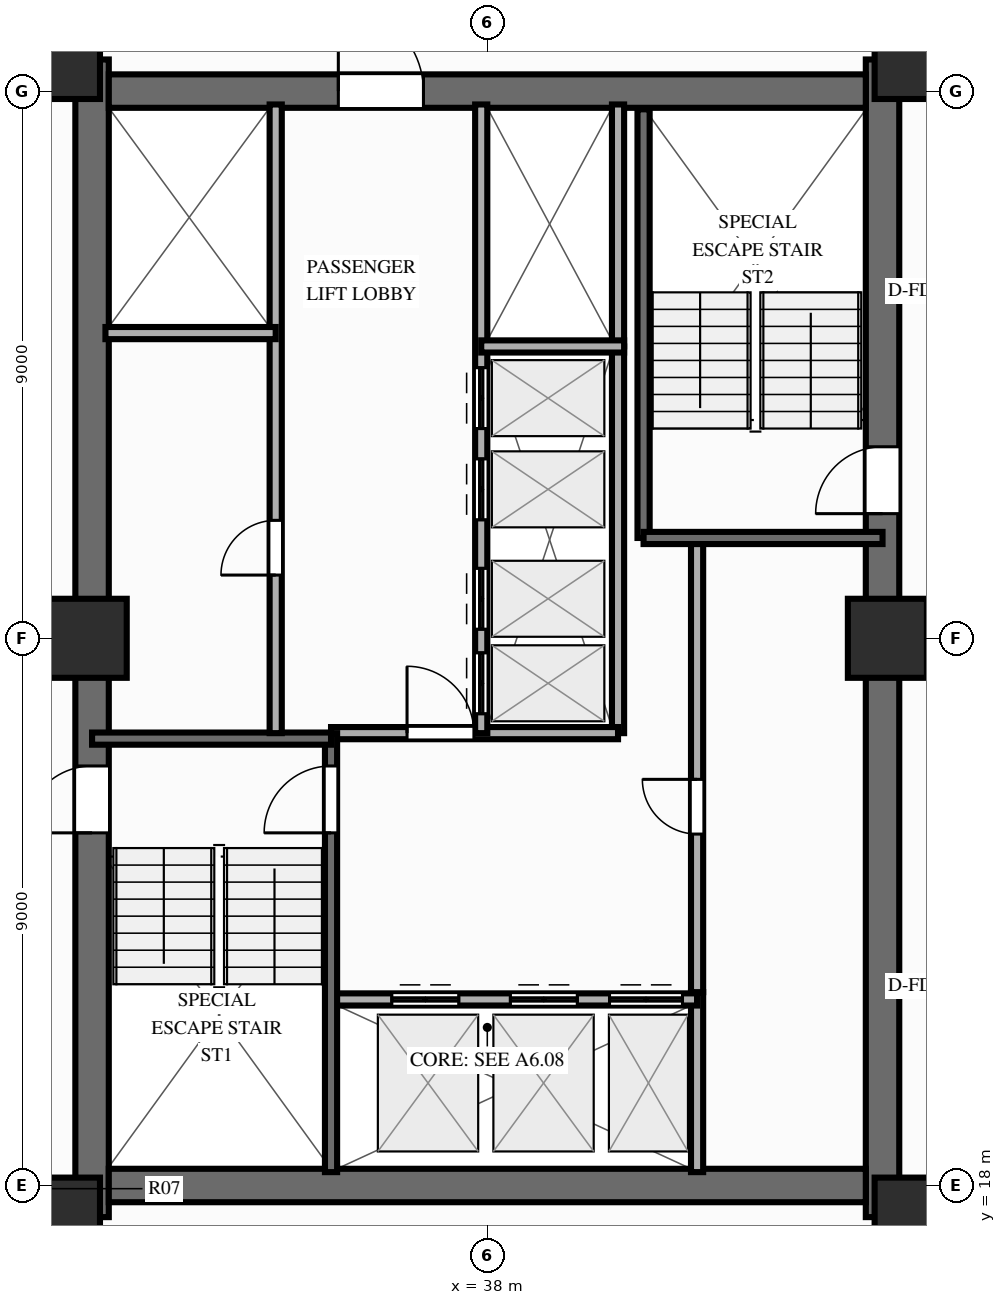
"""IFC4 building model, lengths in metres.
Left out: names, types, materials, properties, quantities, classifications, styles, units other than length and angle.
Written with IfcOpenShell. Run it as: python <this file> out.ifc"""

import sys

from ifc_helpers import new_model, si_unit, direction, frame, frame_2d, origin, origin_2d, place, context, subcontext, project, spatial, rectangle, extrude, source, transform, mapped, element, fill, save


model = new_model("IFC4")
c1 = context("Model", 3, precision=1e-05, world=origin(), true_north=direction((0.0, 1.0)))
c2 = subcontext(c1, "Body", "Model", "MODEL_VIEW")
j1 = project(units=[si_unit("LENGTHUNIT", "METRE"), si_unit("PLANEANGLEUNIT", "RADIAN")], contexts=[c1])
p1 = place(None, origin())
s1 = spatial("IfcSite", under=j1, at=p1, CompositionType="ELEMENT")
p2 = place(p1, origin())
s2 = spatial("IfcBuilding", under=s1, at=p2, CompositionType="ELEMENT")
p3 = place(p2, frame((0.0, 0.0, 138.75)))
s3 = spatial("IfcBuildingStorey", under=s2, at=p3, CompositionType="ELEMENT", Elevation=138.75)
p4 = place(p3, frame((31.5, 17.48, 0.0), z_axis=(0.0, 0.0, 1.0), x_axis=(0.0, 1.0, 0.0)))
e1 = element("IfcWall", 1, at=p4, inside=s3, PredefinedType="SHEAR", context=c2, shape_type="SweptSolid", body=[
    extrude(rectangle(XDim=19.04, YDim=0.55, at=frame_2d((9.52, 0.0))), origin(), (0.0, 0.0, 1.0), 3.0),
])
p5 = place(p4, frame((6.32, 0.0, 0.0)))
e2 = element("IfcOpeningElement", 2, at=p5, cuts=e1, PredefinedType="OPENING", context=c2, shape_type="SweptSolid", body=[
    extrude(rectangle(XDim=1.1, YDim=2.15, at=frame_2d((0.55, 1.075))), frame((0.0, 0.287, 0.0), z_axis=(0.0, -1.0, 0.0), x_axis=(1.0, 0.0, 0.0)), (0.0, 0.0, 1.0), 0.574),
])
p6 = place(p3, frame((44.5, 17.48, 0.0), z_axis=(0.0, 0.0, 1.0), x_axis=(0.0, 1.0, 0.0)))
e3 = element("IfcWall", 3, at=p6, inside=s3, PredefinedType="SHEAR", context=c2, shape_type="SweptSolid", body=[
    extrude(rectangle(XDim=19.04, YDim=0.55, at=frame_2d((9.52, 0.0))), origin(), (0.0, 0.0, 1.0), 3.0),
])
p7 = place(p6, frame((12.67, 0.0, 0.0), z_axis=(0.0, 0.0, 1.0), x_axis=(-1.0, 0.0, 0.0)))
e4 = element("IfcOpeningElement", 4, at=p7, cuts=e3, PredefinedType="OPENING", context=c2, shape_type="SweptSolid", body=[
    extrude(rectangle(XDim=1.1, YDim=2.15, at=frame_2d((0.55, 1.075))), frame((0.0, 0.287, 0.0), z_axis=(0.0, -1.0, 0.0), x_axis=(1.0, 0.0, 0.0)), (0.0, 0.0, 1.0), 0.574),
])
p8 = place(p3, frame((31.775, 18.0, 0.0), z_axis=(0.0, 0.0, 1.0), x_axis=(1.0, 0.0, 0.0)))
e5 = element("IfcWall", 5, at=p8, inside=s3, PredefinedType="SHEAR", context=c2, shape_type="SweptSolid", body=[
    extrude(rectangle(XDim=12.45, YDim=0.55, at=frame_2d((6.225, 0.0))), origin(), (0.0, 0.0, 1.0), 3.0),
])
p9 = place(p3, frame((31.775, 36.0, 0.0), z_axis=(0.0, 0.0, 1.0), x_axis=(1.0, 0.0, 0.0)))
e6 = element("IfcWall", 6, at=p9, inside=s3, PredefinedType="SHEAR", context=c2, shape_type="SweptSolid", body=[
    extrude(rectangle(XDim=12.45, YDim=0.55, at=frame_2d((6.225, 0.0))), origin(), (0.0, 0.0, 1.0), 3.0),
])
p10 = place(p9, frame((5.175, 0.0, 0.0), z_axis=(0.0, 0.0, 1.0), x_axis=(-1.0, 0.0, 0.0)))
e7 = element("IfcOpeningElement", 7, at=p10, cuts=e6, PredefinedType="OPENING", context=c2, shape_type="SweptSolid", body=[
    extrude(rectangle(XDim=1.4, YDim=2.15, at=frame_2d((0.7, 1.075))), frame((0.0, 0.287, 0.0), z_axis=(0.0, -1.0, 0.0), x_axis=(1.0, 0.0, 0.0)), (0.0, 0.0, 1.0), 0.574),
])
m1 = source(origin(), c2, "Body", "SweptSolid", [
    extrude(rectangle(XDim=1.3, YDim=1.3, at=origin_2d()), origin(), (0.0, 0.0, 1.0), 3.0),
])
for number, where, z_axis, x_axis in (
    (8, (30.98, 17.48, 0.0), (0.0, 0.0, 1.0), (1.0, 0.0, 0.0)),
    (9, (45.02, 17.48, 0.0), (0.0, 0.0, 1.0), (1.0, 0.0, 0.0)),
    (10, (30.98, 36.52, 0.0), (0.0, 0.0, 1.0), (1.0, 0.0, 0.0)),
    (11, (45.02, 36.52, 0.0), (0.0, 0.0, 1.0), (1.0, 0.0, 0.0)),
    (12, (31.42, 27.0, 0.0), (0.0, 0.0, 1.0), (1.0, 0.0, 0.0)),
    (13, (44.58, 27.0, 0.0), (0.0, 0.0, 1.0), (1.0, 0.0, 0.0)),
):
    element("IfcColumn", number, at=place(p3, frame(where, z_axis=z_axis, x_axis=x_axis)), inside=s3, PredefinedType="COLUMN", context=c2, shape_type="MappedRepresentation", body=[
        mapped(m1, transform((0.0, 0.0, 0.0), scale=1.0)),
    ])
p11 = place(p3, frame((41.45, 18.22, 0.0), z_axis=(0.0, 0.0, 1.0), x_axis=(0.0, 1.0, 0.0)))
e14 = element("IfcWall", 14, at=p11, inside=s3, PredefinedType="PARTITIONING", context=c2, shape_type="SweptSolid", body=[
    extrude(rectangle(XDim=2.96, YDim=0.2, at=frame_2d((1.48, 0.0))), origin(), (0.0, 0.0, 1.0), 2.79),
])
p12 = place(p3, frame((41.45, 21.18, 0.0), z_axis=(0.0, 0.0, 1.0), x_axis=(0.0, 1.0, 0.0)))
e15 = element("IfcWall", 15, at=p12, inside=s3, PredefinedType="PARTITIONING", context=c2, shape_type="SweptSolid", body=[
    extrude(rectangle(XDim=7.42, YDim=0.2, at=frame_2d((3.71, 0.0))), origin(), (0.0, 0.0, 1.0), 2.79),
])
p13 = place(p12, frame((2.6, 0.0, 0.0)))
e16 = element("IfcOpeningElement", 16, at=p13, cuts=e15, PredefinedType="OPENING", context=c2, shape_type="SweptSolid", body=[
    extrude(rectangle(XDim=0.9, YDim=2.1, at=frame_2d((0.45, 1.05))), frame((0.0, 0.112, 0.0), z_axis=(0.0, -1.0, 0.0), x_axis=(1.0, 0.0, 0.0)), (0.0, 0.0, 1.0), 0.224),
])
p14 = place(p3, frame((40.15, 25.44, 0.0), z_axis=(0.0, 0.0, 1.0), x_axis=(0.0, 1.0, 0.0)))
e17 = element("IfcWall", 17, at=p14, inside=s3, PredefinedType="PARTITIONING", context=c2, shape_type="SweptSolid", body=[
    extrude(rectangle(XDim=6.36, YDim=0.2, at=frame_2d((3.18, 0.0))), origin(), (0.0, 0.0, 1.0), 2.79),
])
p15 = place(p3, frame((40.15, 31.8, 0.0), z_axis=(0.0, 0.0, 1.0), x_axis=(0.0, 1.0, 0.0)))
e18 = element("IfcWall", 18, at=p15, inside=s3, PredefinedType="PARTITIONING", context=c2, shape_type="SweptSolid", body=[
    extrude(rectangle(XDim=3.98, YDim=0.2, at=frame_2d((1.99, 0.0))), origin(), (0.0, 0.0, 1.0), 2.79),
])
p16 = place(p3, frame((35.43, 21.06, 0.0), z_axis=(0.0, 0.0, 1.0), x_axis=(1.0, 0.0, 0.0)))
e19 = element("IfcWall", 19, at=p16, inside=s3, PredefinedType="PARTITIONING", context=c2, shape_type="SweptSolid", body=[
    extrude(rectangle(XDim=6.02, YDim=0.2, at=frame_2d((3.01, 0.0))), origin(), (0.0, 0.0, 1.0), 2.79),
])
p17 = place(p16, frame((1.0, 0.0, 0.0)))
e20 = element("IfcOpeningElement", 20, at=p17, cuts=e19, PredefinedType="OPENING", context=c2, shape_type="SweptSolid", body=[
    extrude(rectangle(XDim=1.1, YDim=2.15, at=frame_2d((0.55, 1.075))), frame((0.0, 0.112, 0.0), z_axis=(0.0, -1.0, 0.0), x_axis=(1.0, 0.0, 0.0)), (0.0, 0.0, 1.0), 0.224),
])
p18 = place(p16, frame((2.95, 0.0, 0.0)))
e21 = element("IfcOpeningElement", 21, at=p18, cuts=e19, PredefinedType="OPENING", context=c2, shape_type="SweptSolid", body=[
    extrude(rectangle(XDim=1.1, YDim=2.15, at=frame_2d((0.55, 1.075))), frame((0.0, 0.112, 0.0), z_axis=(0.0, -1.0, 0.0), x_axis=(1.0, 0.0, 0.0)), (0.0, 0.0, 1.0), 0.224),
])
p19 = place(p16, frame((4.58, 0.0, 0.0)))
e22 = element("IfcOpeningElement", 22, at=p19, cuts=e19, PredefinedType="OPENING", context=c2, shape_type="SweptSolid", body=[
    extrude(rectangle(XDim=1.2, YDim=2.15, at=frame_2d((0.6, 1.075))), frame((0.0, 0.112, 0.0), z_axis=(0.0, -1.0, 0.0), x_axis=(1.0, 0.0, 0.0)), (0.0, 0.0, 1.0), 0.224),
])
p20 = place(p3, frame((35.43, 25.44, 0.0), z_axis=(0.0, 0.0, 1.0), x_axis=(1.0, 0.0, 0.0)))
e23 = element("IfcWall", 23, at=p20, inside=s3, PredefinedType="PARTITIONING", context=c2, shape_type="SweptSolid", body=[
    extrude(rectangle(XDim=4.72, YDim=0.2, at=frame_2d((2.36, 0.0))), origin(), (0.0, 0.0, 1.0), 2.79),
])
p21 = place(p20, frame((1.25, 0.0, 0.0)))
e24 = element("IfcOpeningElement", 24, at=p21, cuts=e23, PredefinedType="OPENING", context=c2, shape_type="SweptSolid", body=[
    extrude(rectangle(XDim=1.1, YDim=2.15, at=frame_2d((0.55, 1.075))), frame((0.0, 0.112, 0.0), z_axis=(0.0, -1.0, 0.0), x_axis=(1.0, 0.0, 0.0)), (0.0, 0.0, 1.0), 0.224),
])
p22 = place(p3, frame((35.43, 18.22, 0.0), z_axis=(0.0, 0.0, 1.0), x_axis=(0.0, 1.0, 0.0)))
e25 = element("IfcWall", 25, at=p22, inside=s3, PredefinedType="SOLIDWALL", context=c2, shape_type="SweptSolid", body=[
    extrude(rectangle(XDim=7.22, YDim=0.2, at=frame_2d((3.61, 0.0))), origin(), (0.0, 0.0, 1.0), 2.79),
])
p23 = place(p22, frame((6.68, 0.0, 0.0), z_axis=(0.0, 0.0, 1.0), x_axis=(-1.0, 0.0, 0.0)))
e26 = element("IfcOpeningElement", 26, at=p23, cuts=e25, PredefinedType="OPENING", context=c2, shape_type="SweptSolid", body=[
    extrude(rectangle(XDim=1.1, YDim=2.15, at=frame_2d((0.55, 1.075))), frame((0.0, 0.112, 0.0), z_axis=(0.0, -1.0, 0.0), x_axis=(1.0, 0.0, 0.0)), (0.0, 0.0, 1.0), 0.224),
])
p24 = place(p3, frame((31.5, 25.35, 0.0), z_axis=(0.0, 0.0, 1.0), x_axis=(1.0, 0.0, 0.0)))
e27 = element("IfcWall", 27, at=p24, inside=s3, PredefinedType="SOLIDWALL", context=c2, shape_type="SweptSolid", body=[
    extrude(rectangle(XDim=3.93, YDim=0.2, at=frame_2d((1.965, 0.0))), origin(), (0.0, 0.0, 1.0), 2.79),
])
p25 = place(p3, frame((40.57, 28.65, 0.0), z_axis=(0.0, 0.0, 1.0), x_axis=(0.0, 1.0, 0.0)))
e28 = element("IfcWall", 28, at=p25, inside=s3, PredefinedType="SOLIDWALL", context=c2, shape_type="SweptSolid", body=[
    extrude(rectangle(XDim=7.05, YDim=0.2, at=frame_2d((3.525, 0.0))), origin(), (0.0, 0.0, 1.0), 2.79),
])
p26 = place(p3, frame((40.57, 28.65, 0.0), z_axis=(0.0, 0.0, 1.0), x_axis=(1.0, 0.0, 0.0)))
e29 = element("IfcWall", 29, at=p26, inside=s3, PredefinedType="SOLIDWALL", context=c2, shape_type="SweptSolid", body=[
    extrude(rectangle(XDim=3.93, YDim=0.2, at=frame_2d((1.965, 0.0))), origin(), (0.0, 0.0, 1.0), 2.79),
])
p27 = place(p3, frame((34.52, 25.44, 0.0), z_axis=(0.0, 0.0, 1.0), x_axis=(0.0, 1.0, 0.0)))
e30 = element("IfcWall", 30, at=p27, inside=s3, PredefinedType="PARTITIONING", context=c2, shape_type="SweptSolid", body=[
    extrude(rectangle(XDim=10.34, YDim=0.2, at=frame_2d((5.17, 0.0))), origin(), (0.0, 0.0, 1.0), 2.79),
])
p28 = place(p27, frame((2.6, 0.0, 0.0)))
e31 = element("IfcOpeningElement", 31, at=p28, cuts=e30, PredefinedType="OPENING", context=c2, shape_type="SweptSolid", body=[
    extrude(rectangle(XDim=0.9, YDim=2.1, at=frame_2d((0.45, 1.05))), frame((0.0, 0.112, 0.0), z_axis=(0.0, -1.0, 0.0), x_axis=(1.0, 0.0, 0.0)), (0.0, 0.0, 1.0), 0.224),
])
p29 = place(p3, frame((31.72, 32.02, 0.0), z_axis=(0.0, 0.0, 1.0), x_axis=(1.0, 0.0, 0.0)))
e32 = element("IfcWall", 32, at=p29, inside=s3, PredefinedType="PARTITIONING", context=c2, shape_type="SweptSolid", body=[
    extrude(rectangle(XDim=2.8, YDim=0.2, at=frame_2d((1.4, 0.0))), origin(), (0.0, 0.0, 1.0), 2.79),
])
p30 = place(p3, frame((37.9, 25.44, 0.0), z_axis=(0.0, 0.0, 1.0), x_axis=(0.0, 1.0, 0.0)))
e33 = element("IfcWall", 33, at=p30, inside=s3, PredefinedType="PARTITIONING", context=c2, shape_type="SweptSolid", body=[
    extrude(rectangle(XDim=10.34, YDim=0.2, at=frame_2d((5.17, 0.0))), origin(), (0.0, 0.0, 1.0), 2.79),
])
p31 = place(p30, frame((0.32, 0.0, 0.0)))
e34 = element("IfcOpeningElement", 34, at=p31, cuts=e33, PredefinedType="OPENING", context=c2, shape_type="SweptSolid", body=[
    extrude(rectangle(XDim=1.0, YDim=2.15, at=frame_2d((0.5, 1.075))), frame((0.0, 0.112, 0.0), z_axis=(0.0, -1.0, 0.0), x_axis=(1.0, 0.0, 0.0)), (0.0, 0.0, 1.0), 0.224),
])
p32 = place(p30, frame((1.71, 0.0, 0.0)))
e35 = element("IfcOpeningElement", 35, at=p32, cuts=e33, PredefinedType="OPENING", context=c2, shape_type="SweptSolid", body=[
    extrude(rectangle(XDim=1.0, YDim=2.15, at=frame_2d((0.5, 1.075))), frame((0.0, 0.112, 0.0), z_axis=(0.0, -1.0, 0.0), x_axis=(1.0, 0.0, 0.0)), (0.0, 0.0, 1.0), 0.224),
])
p33 = place(p30, frame((3.51, 0.0, 0.0)))
e36 = element("IfcOpeningElement", 36, at=p33, cuts=e33, PredefinedType="OPENING", context=c2, shape_type="SweptSolid", body=[
    extrude(rectangle(XDim=1.0, YDim=2.15, at=frame_2d((0.5, 1.075))), frame((0.0, 0.112, 0.0), z_axis=(0.0, -1.0, 0.0), x_axis=(1.0, 0.0, 0.0)), (0.0, 0.0, 1.0), 0.224),
])
p34 = place(p30, frame((5.01, 0.0, 0.0)))
e37 = element("IfcOpeningElement", 37, at=p34, cuts=e33, PredefinedType="OPENING", context=c2, shape_type="SweptSolid", body=[
    extrude(rectangle(XDim=1.0, YDim=2.15, at=frame_2d((0.5, 1.075))), frame((0.0, 0.112, 0.0), z_axis=(0.0, -1.0, 0.0), x_axis=(1.0, 0.0, 0.0)), (0.0, 0.0, 1.0), 0.224),
])
p35 = place(p3, frame((37.9, 31.8, 0.0), z_axis=(0.0, 0.0, 1.0), x_axis=(1.0, 0.0, 0.0)))
e38 = element("IfcWall", 38, at=p35, inside=s3, PredefinedType="PARTITIONING", context=c2, shape_type="SweptSolid", body=[
    extrude(rectangle(XDim=2.35, YDim=0.2, at=frame_2d((1.175, 0.0))), origin(), (0.0, 0.0, 1.0), 2.79),
])
m2 = source(origin(), c2, "Body", "SweptSolid", [
    extrude(rectangle(XDim=1.1, YDim=2.15, at=frame_2d((0.55, 1.075))), frame((0.0, 0.025, 0.0), z_axis=(0.0, -1.0, 0.0), x_axis=(1.0, 0.0, 0.0)), (0.0, 0.0, 1.0), 0.05),
])
p36 = place(p5, origin())
e39 = element("IfcDoor", 39, at=p36, inside=s3, OperationType="SINGLE_SWING_LEFT", PredefinedType="DOOR", context=c2, shape_type="MappedRepresentation", body=[
    mapped(m2, transform((0.0, 0.0, 0.0), scale=1.0)),
])
fill(e2, e39)
p37 = place(p7, origin())
e40 = element("IfcDoor", 40, at=p37, inside=s3, OperationType="SINGLE_SWING_RIGHT", PredefinedType="DOOR", context=c2, shape_type="MappedRepresentation", body=[
    mapped(m2, transform((0.0, 0.0, 0.0), scale=1.0)),
])
fill(e4, e40)
m3 = source(origin(), c2, "Body", "SweptSolid", [
    extrude(rectangle(XDim=1.4, YDim=2.15, at=frame_2d((0.7, 1.075))), frame((0.0, 0.025, 0.0), z_axis=(0.0, -1.0, 0.0), x_axis=(1.0, 0.0, 0.0)), (0.0, 0.0, 1.0), 0.05),
])
p38 = place(p10, origin())
e41 = element("IfcDoor", 41, at=p38, inside=s3, OperationType="SINGLE_SWING_RIGHT", PredefinedType="DOOR", context=c2, shape_type="MappedRepresentation", body=[
    mapped(m3, transform((0.0, 0.0, 0.0), scale=1.0)),
])
fill(e7, e41)
m4 = source(origin(), c2, "Body", "SweptSolid", [
    extrude(rectangle(XDim=0.9, YDim=2.1, at=frame_2d((0.45, 1.05))), frame((0.0, 0.025, 0.0), z_axis=(0.0, -1.0, 0.0), x_axis=(1.0, 0.0, 0.0)), (0.0, 0.0, 1.0), 0.05),
])
p39 = place(p13, origin())
e42 = element("IfcDoor", 42, at=p39, inside=s3, OperationType="SINGLE_SWING_RIGHT", PredefinedType="DOOR", context=c2, shape_type="MappedRepresentation", body=[
    mapped(m4, transform((0.0, 0.0, 0.0), scale=1.0)),
])
fill(e16, e42)
p40 = place(p17, origin())
e43 = element("IfcDoor", 43, at=p40, inside=s3, OperationType="DOUBLE_DOOR_SLIDING", PredefinedType="DOOR", context=c2, shape_type="MappedRepresentation", body=[
    mapped(m2, transform((0.0, 0.0, 0.0), scale=1.0)),
])
fill(e20, e43)
p41 = place(p18, origin())
e44 = element("IfcDoor", 44, at=p41, inside=s3, OperationType="DOUBLE_DOOR_SLIDING", PredefinedType="DOOR", context=c2, shape_type="MappedRepresentation", body=[
    mapped(m2, transform((0.0, 0.0, 0.0), scale=1.0)),
])
fill(e21, e44)
m5 = source(origin(), c2, "Body", "SweptSolid", [
    extrude(rectangle(XDim=1.2, YDim=2.15, at=frame_2d((0.6, 1.075))), frame((0.0, 0.025, 0.0), z_axis=(0.0, -1.0, 0.0), x_axis=(1.0, 0.0, 0.0)), (0.0, 0.0, 1.0), 0.05),
])
p42 = place(p19, origin())
e45 = element("IfcDoor", 45, at=p42, inside=s3, OperationType="DOUBLE_DOOR_SLIDING", PredefinedType="DOOR", context=c2, shape_type="MappedRepresentation", body=[
    mapped(m5, transform((0.0, 0.0, 0.0), scale=1.0)),
])
fill(e22, e45)
p43 = place(p21, origin())
e46 = element("IfcDoor", 46, at=p43, inside=s3, OperationType="SINGLE_SWING_LEFT", PredefinedType="DOOR", context=c2, shape_type="MappedRepresentation", body=[
    mapped(m2, transform((0.0, 0.0, 0.0), scale=1.0)),
])
fill(e24, e46)
p44 = place(p23, origin())
e47 = element("IfcDoor", 47, at=p44, inside=s3, OperationType="SINGLE_SWING_RIGHT", PredefinedType="DOOR", context=c2, shape_type="MappedRepresentation", body=[
    mapped(m2, transform((0.0, 0.0, 0.0), scale=1.0)),
])
fill(e26, e47)
p45 = place(p28, origin())
e48 = element("IfcDoor", 48, at=p45, inside=s3, OperationType="SINGLE_SWING_LEFT", PredefinedType="DOOR", context=c2, shape_type="MappedRepresentation", body=[
    mapped(m4, transform((0.0, 0.0, 0.0), scale=1.0)),
])
fill(e31, e48)
m6 = source(origin(), c2, "Body", "SweptSolid", [
    extrude(rectangle(XDim=1.0, YDim=2.15, at=frame_2d((0.5, 1.075))), frame((0.0, 0.025, 0.0), z_axis=(0.0, -1.0, 0.0), x_axis=(1.0, 0.0, 0.0)), (0.0, 0.0, 1.0), 0.05),
])
p46 = place(p31, origin())
e49 = element("IfcDoor", 49, at=p46, inside=s3, OperationType="DOUBLE_DOOR_SLIDING", PredefinedType="DOOR", context=c2, shape_type="MappedRepresentation", body=[
    mapped(m6, transform((0.0, 0.0, 0.0), scale=1.0)),
])
fill(e34, e49)
p47 = place(p32, origin())
e50 = element("IfcDoor", 50, at=p47, inside=s3, OperationType="DOUBLE_DOOR_SLIDING", PredefinedType="DOOR", context=c2, shape_type="MappedRepresentation", body=[
    mapped(m6, transform((0.0, 0.0, 0.0), scale=1.0)),
])
fill(e35, e50)
p48 = place(p33, origin())
e51 = element("IfcDoor", 51, at=p48, inside=s3, OperationType="DOUBLE_DOOR_SLIDING", PredefinedType="DOOR", context=c2, shape_type="MappedRepresentation", body=[
    mapped(m6, transform((0.0, 0.0, 0.0), scale=1.0)),
])
fill(e36, e51)
p49 = place(p34, origin())
e52 = element("IfcDoor", 52, at=p49, inside=s3, OperationType="DOUBLE_DOOR_SLIDING", PredefinedType="DOOR", context=c2, shape_type="MappedRepresentation", body=[
    mapped(m6, transform((0.0, 0.0, 0.0), scale=1.0)),
])
fill(e37, e52)
save(model, sys.argv[1])
